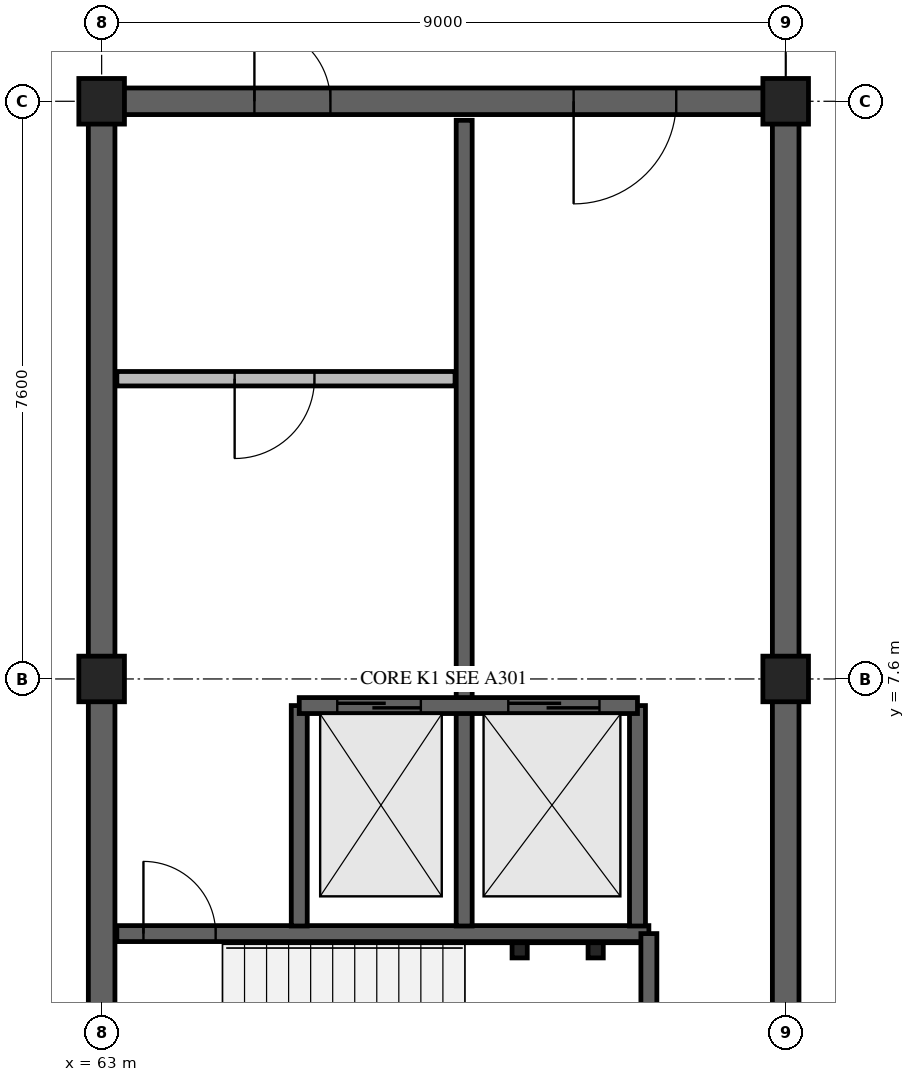
"""IFC4 building model, lengths in metres.
Left out: names, types, materials, properties, quantities, classifications, styles, units other than length and angle.
Written with IfcOpenShell. Run it as: python <this file> out.ifc"""

import sys

from ifc_helpers import new_model, si_unit, direction, frame, frame_2d, origin, origin_2d, place, context, subcontext, project, spatial, rectangle, hollow_rectangle, extrude, element, fill, save


model = new_model("IFC4")
c1 = context("Model", 3, precision=1e-05, world=origin(), true_north=direction((0.0, 1.0)))
c2 = subcontext(c1, "Body", "Model", "MODEL_VIEW")
j1 = project(units=[si_unit("LENGTHUNIT", "METRE"), si_unit("PLANEANGLEUNIT", "RADIAN")], contexts=[c1])
p1 = place(None, origin())
s1 = spatial("IfcSite", under=j1, at=p1, CompositionType="ELEMENT")
p2 = place(p1, origin())
s2 = spatial("IfcBuilding", under=s1, at=p2, CompositionType="ELEMENT")
p3 = place(p2, frame((0.0, 0.0, -4.32)))
s3 = spatial("IfcBuildingStorey", under=s2, at=p3, CompositionType="ELEMENT", Elevation=-4.32)
for number, where, z_axis, x_axis in (
    (1, (63.0, 7.6, 0.0), (0.0, 0.0, 1.0), (1.0, 0.0, 0.0)),
    (2, (63.0, 15.2, 0.0), (0.0, 0.0, 1.0), (1.0, 0.0, 0.0)),
    (3, (72.0, 7.6, 0.0), (0.0, 0.0, 1.0), (1.0, 0.0, 0.0)),
    (4, (72.0, 15.2, 0.0), (0.0, 0.0, 1.0), (1.0, 0.0, 0.0)),
):
    element("IfcColumn", number, at=place(p3, frame(where, z_axis=z_axis, x_axis=x_axis)), inside=s3, PredefinedType="COLUMN", context=c2, shape_type="SweptSolid", body=[
        extrude(rectangle(XDim=0.6, YDim=0.6, at=origin_2d()), origin(), (0.0, 0.0, 1.0), 4.32),
    ])
p4 = place(p3, frame((63.16, 15.2, 0.0), z_axis=(0.0, 0.0, 1.0), x_axis=(1.0, 0.0, 0.0)))
e5 = element("IfcWall", 5, at=p4, inside=s3, PredefinedType="SHEAR", context=c2, shape_type="SweptSolid", body=[
    extrude(rectangle(XDim=8.68, YDim=0.35, at=frame_2d((4.34, 0.0))), origin(), (0.0, 0.0, 1.0), 4.04),
])
p5 = place(p4, frame((1.85, 0.0, 0.0)))
e6 = element("IfcOpeningElement", 6, at=p5, cuts=e5, PredefinedType="OPENING", context=c2, shape_type="SweptSolid", body=[
    extrude(rectangle(XDim=1.0, YDim=2.15, at=frame_2d((0.5, 1.075))), frame((0.0, 0.185, 0.0), z_axis=(0.0, -1.0, 0.0), x_axis=(1.0, 0.0, 0.0)), (0.0, 0.0, 1.0), 0.37),
])
p6 = place(p4, frame((6.05, 0.0, 0.0)))
e7 = element("IfcOpeningElement", 7, at=p6, cuts=e5, PredefinedType="OPENING", context=c2, shape_type="SweptSolid", body=[
    extrude(rectangle(XDim=1.35, YDim=2.18, at=frame_2d((0.675, 1.09))), frame((0.0, 0.185, 0.0), z_axis=(0.0, -1.0, 0.0), x_axis=(1.0, 0.0, 0.0)), (0.0, 0.0, 1.0), 0.37),
])
for number, where, z_axis, x_axis in (
    (8, (63.0, 0.16, 0.0), (0.0, 0.0, 1.0), (0.0, 1.0, 0.0)),
    (9, (72.0, 0.16, 0.0), (0.0, 0.0, 1.0), (0.0, 1.0, 0.0)),
):
    element("IfcWall", number, at=place(p3, frame(where, z_axis=z_axis, x_axis=x_axis)), inside=s3, PredefinedType="SHEAR", context=c2, shape_type="SweptSolid", body=[
        extrude(rectangle(XDim=14.88, YDim=0.35, at=frame_2d((7.44, 0.0))), origin(), (0.0, 0.0, 1.0), 4.04),
    ])
p7 = place(p3, frame((63.2, 4.25, 0.0), z_axis=(0.0, 0.0, 1.0), x_axis=(1.0, 0.0, 0.0)))
e10 = element("IfcWall", 10, at=p7, inside=s3, PredefinedType="SOLIDWALL", context=c2, shape_type="SweptSolid", body=[
    extrude(rectangle(XDim=7.0, YDim=0.21, at=frame_2d((3.5, 0.0))), origin(), (0.0, 0.0, 1.0), 4.04),
])
p8 = place(p7, frame((0.35, 0.0, 0.0)))
e11 = element("IfcOpeningElement", 11, at=p8, cuts=e10, PredefinedType="OPENING", context=c2, shape_type="SweptSolid", body=[
    extrude(rectangle(XDim=0.95, YDim=2.12, at=frame_2d((0.475, 1.06))), frame((0.0, 0.115, 0.0), z_axis=(0.0, -1.0, 0.0), x_axis=(1.0, 0.0, 0.0)), (0.0, 0.0, 1.0), 0.23),
])
p9 = place(p3, frame((70.2, 0.2, 0.0), z_axis=(0.0, 0.0, 1.0), x_axis=(0.0, 1.0, 0.0)))
e12 = element("IfcWall", 12, at=p9, inside=s3, PredefinedType="SOLIDWALL", context=c2, shape_type="SweptSolid", body=[
    extrude(rectangle(XDim=4.05, YDim=0.21, at=frame_2d((2.025, 0.0))), origin(), (0.0, 0.0, 1.0), 4.04),
])
p10 = place(p3, frame((65.6, 4.35, 0.0), z_axis=(0.0, 0.0, 1.0), x_axis=(0.0, 1.0, 0.0)))
e13 = element("IfcWall", 13, at=p10, inside=s3, PredefinedType="SOLIDWALL", context=c2, shape_type="SweptSolid", body=[
    extrude(rectangle(XDim=2.9, YDim=0.21, at=frame_2d((1.45, 0.0))), origin(), (0.0, 0.0, 1.0), 4.04),
])
p11 = place(p3, frame((67.77, 4.35, 0.0), z_axis=(0.0, 0.0, 1.0), x_axis=(0.0, 1.0, 0.0)))
e14 = element("IfcWall", 14, at=p11, inside=s3, PredefinedType="SOLIDWALL", context=c2, shape_type="SweptSolid", body=[
    extrude(rectangle(XDim=10.6, YDim=0.21, at=frame_2d((5.3, 0.0))), origin(), (0.0, 0.0, 1.0), 4.04),
])
p12 = place(p3, frame((70.05, 4.35, 0.0), z_axis=(0.0, 0.0, 1.0), x_axis=(0.0, 1.0, 0.0)))
e15 = element("IfcWall", 15, at=p12, inside=s3, PredefinedType="SOLIDWALL", context=c2, shape_type="SweptSolid", body=[
    extrude(rectangle(XDim=2.9, YDim=0.21, at=frame_2d((1.45, 0.0))), origin(), (0.0, 0.0, 1.0), 4.04),
])
p13 = place(p3, frame((65.6, 7.25, 0.0), z_axis=(0.0, 0.0, 1.0), x_axis=(1.0, 0.0, 0.0)))
e16 = element("IfcWall", 16, at=p13, inside=s3, PredefinedType="SOLIDWALL", context=c2, shape_type="SweptSolid", body=[
    extrude(rectangle(XDim=4.45, YDim=0.21, at=frame_2d((2.225, 0.0))), origin(), (0.0, 0.0, 1.0), 4.04),
])
p14 = place(p13, frame((0.5, 0.0, 0.0)))
e17 = element("IfcOpeningElement", 17, at=p14, cuts=e16, PredefinedType="OPENING", context=c2, shape_type="SweptSolid", body=[
    extrude(rectangle(XDim=1.1, YDim=2.14, at=frame_2d((0.55, 1.07))), frame((0.0, 0.115, 0.0), z_axis=(0.0, -1.0, 0.0), x_axis=(1.0, 0.0, 0.0)), (0.0, 0.0, 1.0), 0.23),
])
p15 = place(p13, frame((2.75, 0.0, 0.0)))
e18 = element("IfcOpeningElement", 18, at=p15, cuts=e16, PredefinedType="OPENING", context=c2, shape_type="SweptSolid", body=[
    extrude(rectangle(XDim=1.2, YDim=2.18, at=frame_2d((0.6, 1.09))), frame((0.0, 0.115, 0.0), z_axis=(0.0, -1.0, 0.0), x_axis=(1.0, 0.0, 0.0)), (0.0, 0.0, 1.0), 0.23),
])
p16 = place(p3, frame((63.2, 11.55, 0.0), z_axis=(0.0, 0.0, 1.0), x_axis=(1.0, 0.0, 0.0)))
e19 = element("IfcWall", 19, at=p16, inside=s3, PredefinedType="SOLIDWALL", context=c2, shape_type="SweptSolid", body=[
    extrude(rectangle(XDim=4.45, YDim=0.19, at=frame_2d((2.225, 0.0))), origin(), (0.0, 0.0, 1.0), 4.04),
])
p17 = place(p16, frame((1.55, 0.0, 0.0)))
e20 = element("IfcOpeningElement", 20, at=p17, cuts=e19, PredefinedType="OPENING", context=c2, shape_type="SweptSolid", body=[
    extrude(rectangle(XDim=1.05, YDim=2.12, at=frame_2d((0.525, 1.06))), frame((0.0, 0.105, 0.0), z_axis=(0.0, -1.0, 0.0), x_axis=(1.0, 0.0, 0.0)), (0.0, 0.0, 1.0), 0.21),
])
for number, where, z_axis, x_axis in (
    (21, (68.5, 4.03, 0.0), (0.0, 0.0, 1.0), (1.0, 0.0, 0.0)),
    (22, (69.5, 4.03, 0.0), (0.0, 0.0, 1.0), (1.0, 0.0, 0.0)),
):
    element("IfcColumn", number, at=place(p3, frame(where, z_axis=z_axis, x_axis=x_axis)), inside=s3, PredefinedType="COLUMN", context=c2, shape_type="SweptSolid", body=[
        extrude(hollow_rectangle(XDim=0.2, YDim=0.2, WallThickness=0.012, at=origin_2d()), origin(), (0.0, 0.0, 1.0), 4.32),
    ])
p18 = place(p8, origin())
e23 = element("IfcDoor", 23, at=p18, inside=s3, OperationType="SINGLE_SWING_LEFT", PredefinedType="DOOR", context=c2, shape_type="SweptSolid", body=[
    extrude(rectangle(XDim=0.95, YDim=2.12, at=frame_2d((0.475, 1.06))), frame((0.0, 0.025, 0.0), z_axis=(0.0, -1.0, 0.0), x_axis=(1.0, 0.0, 0.0)), (0.0, 0.0, 1.0), 0.05),
])
fill(e11, e23)
p19 = place(p14, origin())
e24 = element("IfcDoor", 24, at=p19, inside=s3, OperationType="SLIDING_TO_LEFT", PredefinedType="DOOR", context=c2, shape_type="SweptSolid", body=[
    extrude(rectangle(XDim=1.1, YDim=2.14, at=frame_2d((0.55, 1.07))), frame((0.0, 0.025, 0.0), z_axis=(0.0, -1.0, 0.0), x_axis=(1.0, 0.0, 0.0)), (0.0, 0.0, 1.0), 0.05),
])
fill(e17, e24)
p20 = place(p15, origin())
e25 = element("IfcDoor", 25, at=p20, inside=s3, OperationType="SLIDING_TO_LEFT", PredefinedType="DOOR", context=c2, shape_type="SweptSolid", body=[
    extrude(rectangle(XDim=1.2, YDim=2.18, at=frame_2d((0.6, 1.09))), frame((0.0, 0.025, 0.0), z_axis=(0.0, -1.0, 0.0), x_axis=(1.0, 0.0, 0.0)), (0.0, 0.0, 1.0), 0.05),
])
fill(e18, e25)
p21 = place(p17, origin())
e26 = element("IfcDoor", 26, at=p21, inside=s3, OperationType="SINGLE_SWING_RIGHT", PredefinedType="DOOR", context=c2, shape_type="SweptSolid", body=[
    extrude(rectangle(XDim=1.05, YDim=2.12, at=frame_2d((0.525, 1.06))), frame((0.0, 0.025, 0.0), z_axis=(0.0, -1.0, 0.0), x_axis=(1.0, 0.0, 0.0)), (0.0, 0.0, 1.0), 0.05),
])
fill(e20, e26)
p22 = place(p5, origin())
e27 = element("IfcDoor", 27, at=p22, inside=s3, OperationType="SINGLE_SWING_LEFT", PredefinedType="DOOR", context=c2, shape_type="SweptSolid", body=[
    extrude(rectangle(XDim=1.0, YDim=2.15, at=frame_2d((0.5, 1.075))), frame((0.0, 0.025, 0.0), z_axis=(0.0, -1.0, 0.0), x_axis=(1.0, 0.0, 0.0)), (0.0, 0.0, 1.0), 0.05),
])
fill(e6, e27)
p23 = place(p6, origin())
e28 = element("IfcDoor", 28, at=p23, inside=s3, OperationType="SINGLE_SWING_RIGHT", PredefinedType="DOOR", context=c2, shape_type="SweptSolid", body=[
    extrude(rectangle(XDim=1.35, YDim=2.18, at=frame_2d((0.675, 1.09))), frame((0.0, 0.025, 0.0), z_axis=(0.0, -1.0, 0.0), x_axis=(1.0, 0.0, 0.0)), (0.0, 0.0, 1.0), 0.05),
])
fill(e7, e28)
save(model, sys.argv[1])
